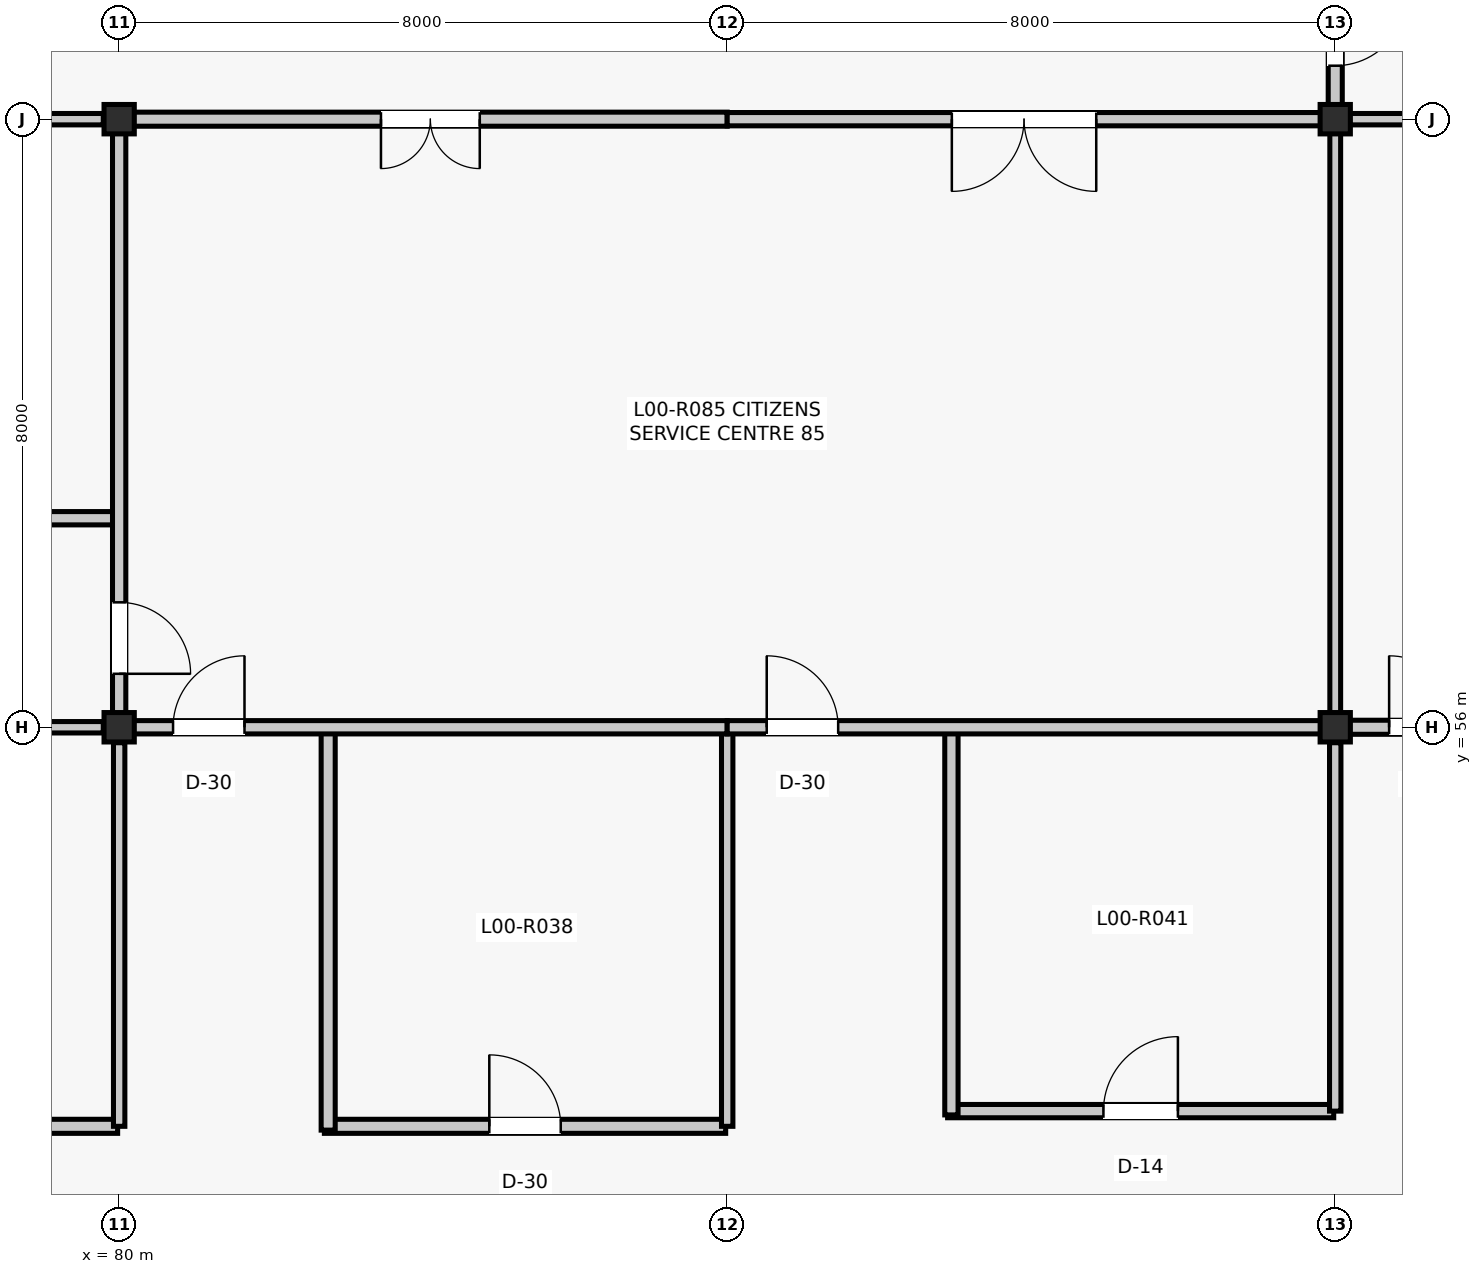
"""IFC4 building model, lengths in metres.
Left out: names, types, materials, properties, quantities, classifications, styles, units other than length and angle.
Written with IfcOpenShell. Run it as: python <this file> out.ifc"""

import sys

from ifc_helpers import new_model, si_unit, direction, frame, frame_2d, origin, origin_2d, place, context, subcontext, project, spatial, rectangle, i_section, extrude, element, fill, save


model = new_model("IFC4")
c1 = context("Model", 3, precision=1e-05, world=origin(), true_north=direction((0.0, 1.0)))
c2 = subcontext(c1, "Body", "Model", "MODEL_VIEW")
j1 = project(units=[si_unit("LENGTHUNIT", "METRE"), si_unit("PLANEANGLEUNIT", "RADIAN")], contexts=[c1])
p1 = place(None, origin())
s1 = spatial("IfcSite", under=j1, at=p1, CompositionType="ELEMENT")
p2 = place(p1, origin())
s2 = spatial("IfcBuilding", under=s1, at=p2, CompositionType="ELEMENT")
p3 = place(p2, origin())
s3 = spatial("IfcBuildingStorey", under=s2, at=p3, CompositionType="ELEMENT", Elevation=0.0)
for number, where, z_axis, x_axis in (
    (1, (80.0, 56.0, 0.0), (0.0, 0.0, 1.0), (1.0, 0.0, 0.0)),
    (2, (80.0, 64.0, 0.0), (0.0, 0.0, 1.0), (1.0, 0.0, 0.0)),
    (3, (96.0, 56.0, 0.0), (0.0, 0.0, 1.0), (1.0, 0.0, 0.0)),
    (4, (96.0, 64.0, 0.0), (0.0, 0.0, 1.0), (1.0, 0.0, 0.0)),
):
    element("IfcColumn", number, at=place(p3, frame(where, z_axis=z_axis, x_axis=x_axis)), inside=s3, PredefinedType="COLUMN", context=c2, shape_type="SweptSolid", body=[
        extrude(i_section(OverallWidth=0.398, OverallDepth=0.387, WebThickness=0.021, FlangeThickness=0.033, FilletRadius=0.015, at=origin_2d()), origin(), (0.0, 0.0, 1.0), 5.28),
    ])
p4 = place(p3, frame((74.7, 50.75, 0.0), z_axis=(0.0, 0.0, 1.0), x_axis=(1.0, 0.0, 0.0)))
e5 = element("IfcWall", 5, at=p4, inside=s3, PredefinedType="PARTITIONING", context=c2, shape_type="SweptSolid", body=[
    extrude(rectangle(XDim=5.28, YDim=0.185, at=frame_2d((2.64, 0.0))), origin(), (0.0, 0.0, 1.0), 4.403),
])
p5 = place(p4, frame((2.12, 0.0, 0.0)))
e6 = element("IfcOpeningElement", 6, at=p5, cuts=e5, PredefinedType="OPENING", context=c2, shape_type="SweptSolid", body=[
    extrude(rectangle(XDim=1.04, YDim=2.18, at=frame_2d((0.52, 1.09))), frame((0.0, 0.103, 0.0), z_axis=(0.0, -1.0, 0.0), x_axis=(1.0, 0.0, 0.0)), (0.0, 0.0, 1.0), 0.205),
])
p6 = place(p3, frame((74.75, 56.0, 0.0), z_axis=(0.0, 0.0, 1.0), x_axis=(1.0, 0.0, 0.0)))
e7 = element("IfcWall", 7, at=p6, inside=s3, PredefinedType="PARTITIONING", context=c2, shape_type="SweptSolid", body=[
    extrude(rectangle(XDim=5.041, YDim=0.15, at=frame_2d((2.521, 0.0))), origin(), (0.0, 0.0, 1.0), 4.327),
])
p7 = place(p3, frame((80.0, 50.75, 0.0), z_axis=(0.0, 0.0, 1.0), x_axis=(0.0, 1.0, 0.0)))
e8 = element("IfcWall", 8, at=p7, inside=s3, PredefinedType="PARTITIONING", context=c2, shape_type="SweptSolid", body=[
    extrude(rectangle(XDim=5.046, YDim=0.15, at=frame_2d((2.523, 0.0))), origin(), (0.0, 0.0, 1.0), 4.403),
])
p8 = place(p3, frame((74.7, 58.75, 0.0), z_axis=(0.0, 0.0, 1.0), x_axis=(1.0, 0.0, 0.0)))
e9 = element("IfcWall", 9, at=p8, inside=s3, PredefinedType="PARTITIONING", context=c2, shape_type="SweptSolid", body=[
    extrude(rectangle(XDim=5.28, YDim=0.175, at=frame_2d((2.64, 0.0))), origin(), (0.0, 0.0, 1.0), 4.412),
])
p9 = place(p8, frame((2.16, 0.0, 0.0)))
e10 = element("IfcOpeningElement", 10, at=p9, cuts=e9, PredefinedType="OPENING", context=c2, shape_type="SweptSolid", body=[
    extrude(rectangle(XDim=0.96, YDim=2.14, at=frame_2d((0.48, 1.07))), frame((0.0, 0.097, 0.0), z_axis=(0.0, -1.0, 0.0), x_axis=(1.0, 0.0, 0.0)), (0.0, 0.0, 1.0), 0.195),
])
p10 = place(p3, frame((74.75, 64.0, 0.0), z_axis=(0.0, 0.0, 1.0), x_axis=(1.0, 0.0, 0.0)))
e11 = element("IfcWall", 11, at=p10, inside=s3, PredefinedType="PARTITIONING", context=c2, shape_type="SweptSolid", body=[
    extrude(rectangle(XDim=5.041, YDim=0.15, at=frame_2d((2.521, 0.0))), origin(), (0.0, 0.0, 1.0), 4.403),
])
p11 = place(p3, frame((82.7, 50.75, 0.0), z_axis=(0.0, 0.0, 1.0), x_axis=(1.0, 0.0, 0.0)))
e12 = element("IfcWall", 12, at=p11, inside=s3, PredefinedType="PARTITIONING", context=c2, shape_type="SweptSolid", body=[
    extrude(rectangle(XDim=5.28, YDim=0.185, at=frame_2d((2.64, 0.0))), origin(), (0.0, 0.0, 1.0), 5.025),
])
p12 = place(p11, frame((2.17, 0.0, 0.0)))
e13 = element("IfcOpeningElement", 13, at=p12, cuts=e12, PredefinedType="OPENING", context=c2, shape_type="SweptSolid", body=[
    extrude(rectangle(XDim=0.94, YDim=2.12, at=frame_2d((0.47, 1.06))), frame((0.0, 0.103, 0.0), z_axis=(0.0, -1.0, 0.0), x_axis=(1.0, 0.0, 0.0)), (0.0, 0.0, 1.0), 0.205),
])
p13 = place(p3, frame((82.75, 50.7, 0.0), z_axis=(0.0, 0.0, 1.0), x_axis=(0.0, 1.0, 0.0)))
e14 = element("IfcWall", 14, at=p13, inside=s3, PredefinedType="PARTITIONING", context=c2, shape_type="SweptSolid", body=[
    extrude(rectangle(XDim=5.28, YDim=0.185, at=frame_2d((2.64, 0.0))), origin(), (0.0, 0.0, 1.0), 4.169),
])
p14 = place(p3, frame((88.0, 50.75, 0.0), z_axis=(0.0, 0.0, 1.0), x_axis=(0.0, 1.0, 0.0)))
e15 = element("IfcWall", 15, at=p14, inside=s3, PredefinedType="PARTITIONING", context=c2, shape_type="SweptSolid", body=[
    extrude(rectangle(XDim=5.23, YDim=0.15, at=frame_2d((2.615, 0.0))), origin(), (0.0, 0.0, 1.0), 4.169),
])
p15 = place(p3, frame((90.9, 50.95, 0.0), z_axis=(0.0, 0.0, 1.0), x_axis=(1.0, 0.0, 0.0)))
e16 = element("IfcWall", 16, at=p15, inside=s3, PredefinedType="PARTITIONING", context=c2, shape_type="SweptSolid", body=[
    extrude(rectangle(XDim=5.08, YDim=0.175, at=frame_2d((2.54, 0.0))), origin(), (0.0, 0.0, 1.0), 4.404),
])
p16 = place(p15, frame((2.05, 0.0, 0.0)))
e17 = element("IfcOpeningElement", 17, at=p16, cuts=e16, PredefinedType="OPENING", context=c2, shape_type="SweptSolid", body=[
    extrude(rectangle(XDim=0.98, YDim=2.15, at=frame_2d((0.49, 1.075))), frame((0.0, 0.097, 0.0), z_axis=(0.0, -1.0, 0.0), x_axis=(1.0, 0.0, 0.0)), (0.0, 0.0, 1.0), 0.195),
])
p17 = place(p3, frame((90.95, 50.9, 0.0), z_axis=(0.0, 0.0, 1.0), x_axis=(0.0, 1.0, 0.0)))
e18 = element("IfcWall", 18, at=p17, inside=s3, PredefinedType="PARTITIONING", context=c2, shape_type="SweptSolid", body=[
    extrude(rectangle(XDim=5.08, YDim=0.175, at=frame_2d((2.54, 0.0))), origin(), (0.0, 0.0, 1.0), 4.169),
])
p18 = place(p3, frame((96.0, 50.95, 0.0), z_axis=(0.0, 0.0, 1.0), x_axis=(0.0, 1.0, 0.0)))
e19 = element("IfcWall", 19, at=p18, inside=s3, PredefinedType="PARTITIONING", context=c2, shape_type="SweptSolid", body=[
    extrude(rectangle(XDim=4.846, YDim=0.15, at=frame_2d((2.423, 0.0))), origin(), (0.0, 0.0, 1.0), 4.404),
])
p19 = place(p3, frame((80.0, 56.184, 0.0), z_axis=(0.0, 0.0, 1.0), x_axis=(0.0, 1.0, 0.0)))
e20 = element("IfcWall", 20, at=p19, inside=s3, PredefinedType="PARTITIONING", context=c2, shape_type="SweptSolid", body=[
    extrude(rectangle(XDim=7.633, YDim=0.175, at=frame_2d((3.816, 0.0))), origin(), (0.0, 0.0, 1.0), 4.412),
])
p20 = place(p19, frame((0.52, 0.0, 0.0)))
e21 = element("IfcOpeningElement", 21, at=p20, cuts=e20, PredefinedType="OPENING", context=c2, shape_type="SweptSolid", body=[
    extrude(rectangle(XDim=0.94, YDim=2.12, at=frame_2d((0.47, 1.06))), frame((0.0, 0.097, 0.0), z_axis=(0.0, -1.0, 0.0), x_axis=(1.0, 0.0, 0.0)), (0.0, 0.0, 1.0), 0.195),
])
p21 = place(p3, frame((80.189, 56.0, 0.0), z_axis=(0.0, 0.0, 1.0), x_axis=(1.0, 0.0, 0.0)))
e22 = element("IfcWall", 22, at=p21, inside=s3, PredefinedType="PARTITIONING", context=c2, shape_type="SweptSolid", body=[
    extrude(rectangle(XDim=7.811, YDim=0.175, at=frame_2d((3.906, 0.0))), origin(), (0.0, 0.0, 1.0), 4.169),
])
p22 = place(p21, frame((0.52, 0.0, 0.0)))
e23 = element("IfcOpeningElement", 23, at=p22, cuts=e22, PredefinedType="OPENING", context=c2, shape_type="SweptSolid", body=[
    extrude(rectangle(XDim=0.94, YDim=2.12, at=frame_2d((0.47, 1.06))), frame((0.0, 0.097, 0.0), z_axis=(0.0, -1.0, 0.0), x_axis=(1.0, 0.0, 0.0)), (0.0, 0.0, 1.0), 0.195),
])
p23 = place(p3, frame((80.189, 64.0, 0.0), z_axis=(0.0, 0.0, 1.0), x_axis=(1.0, 0.0, 0.0)))
e24 = element("IfcWall", 24, at=p23, inside=s3, PredefinedType="PARTITIONING", context=c2, shape_type="SweptSolid", body=[
    extrude(rectangle(XDim=7.811, YDim=0.185, at=frame_2d((3.906, 0.0))), origin(), (0.0, 0.0, 1.0), 4.25),
])
p24 = place(p23, frame((3.256, 0.0, 0.0)))
e25 = element("IfcOpeningElement", 25, at=p24, cuts=e24, PredefinedType="OPENING", context=c2, shape_type="SweptSolid", body=[
    extrude(rectangle(XDim=1.3, YDim=2.2, at=frame_2d((0.65, 1.1))), frame((0.0, 0.103, 0.0), z_axis=(0.0, -1.0, 0.0), x_axis=(1.0, 0.0, 0.0)), (0.0, 0.0, 1.0), 0.205),
])
p25 = place(p3, frame((88.0, 56.0, 0.0), z_axis=(0.0, 0.0, 1.0), x_axis=(1.0, 0.0, 0.0)))
e26 = element("IfcWall", 26, at=p25, inside=s3, PredefinedType="PARTITIONING", context=c2, shape_type="SweptSolid", body=[
    extrude(rectangle(XDim=7.811, YDim=0.175, at=frame_2d((3.906, 0.0))), origin(), (0.0, 0.0, 1.0), 4.169),
])
p26 = place(p25, frame((0.52, 0.0, 0.0)))
e27 = element("IfcOpeningElement", 27, at=p26, cuts=e26, PredefinedType="OPENING", context=c2, shape_type="SweptSolid", body=[
    extrude(rectangle(XDim=0.94, YDim=2.12, at=frame_2d((0.47, 1.06))), frame((0.0, 0.097, 0.0), z_axis=(0.0, -1.0, 0.0), x_axis=(1.0, 0.0, 0.0)), (0.0, 0.0, 1.0), 0.195),
])
p27 = place(p3, frame((96.0, 56.184, 0.0), z_axis=(0.0, 0.0, 1.0), x_axis=(0.0, 1.0, 0.0)))
e28 = element("IfcWall", 28, at=p27, inside=s3, PredefinedType="PARTITIONING", context=c2, shape_type="SweptSolid", body=[
    extrude(rectangle(XDim=7.633, YDim=0.142, at=frame_2d((3.816, 0.0))), origin(), (0.0, 0.0, 1.0), 4.471),
])
p28 = place(p3, frame((88.0, 64.0, 0.0), z_axis=(0.0, 0.0, 1.0), x_axis=(1.0, 0.0, 0.0)))
e29 = element("IfcWall", 29, at=p28, inside=s3, PredefinedType="PARTITIONING", context=c2, shape_type="SweptSolid", body=[
    extrude(rectangle(XDim=7.811, YDim=0.175, at=frame_2d((3.906, 0.0))), origin(), (0.0, 0.0, 1.0), 4.25),
])
p29 = place(p28, frame((2.956, 0.0, 0.0)))
e30 = element("IfcOpeningElement", 30, at=p29, cuts=e29, PredefinedType="OPENING", context=c2, shape_type="SweptSolid", body=[
    extrude(rectangle(XDim=1.9, YDim=2.38, at=frame_2d((0.95, 1.19))), frame((0.0, 0.097, 0.0), z_axis=(0.0, -1.0, 0.0), x_axis=(1.0, 0.0, 0.0)), (0.0, 0.0, 1.0), 0.195),
])
p30 = place(p3, frame((96.0, 64.184, 0.0), z_axis=(0.0, 0.0, 1.0), x_axis=(0.0, 1.0, 0.0)))
e31 = element("IfcWall", 31, at=p30, inside=s3, PredefinedType="PARTITIONING", context=c2, shape_type="SweptSolid", body=[
    extrude(rectangle(XDim=7.633, YDim=0.185, at=frame_2d((3.816, 0.0))), origin(), (0.0, 0.0, 1.0), 4.403),
])
p31 = place(p30, frame((0.52, 0.0, 0.0)))
e32 = element("IfcOpeningElement", 32, at=p31, cuts=e31, PredefinedType="OPENING", context=c2, shape_type="SweptSolid", body=[
    extrude(rectangle(XDim=0.94, YDim=2.12, at=frame_2d((0.47, 1.06))), frame((0.0, 0.103, 0.0), z_axis=(0.0, -1.0, 0.0), x_axis=(1.0, 0.0, 0.0)), (0.0, 0.0, 1.0), 0.205),
])
p32 = place(p3, frame((96.189, 56.0, 0.0), z_axis=(0.0, 0.0, 1.0), x_axis=(1.0, 0.0, 0.0)))
e33 = element("IfcWall", 33, at=p32, inside=s3, PredefinedType="PARTITIONING", context=c2, shape_type="SweptSolid", body=[
    extrude(rectangle(XDim=7.396, YDim=0.185, at=frame_2d((3.698, 0.0))), origin(), (0.0, 0.0, 1.0), 4.404),
])
p33 = place(p32, frame((0.52, 0.0, 0.0)))
e34 = element("IfcOpeningElement", 34, at=p33, cuts=e33, PredefinedType="OPENING", context=c2, shape_type="SweptSolid", body=[
    extrude(rectangle(XDim=0.94, YDim=2.12, at=frame_2d((0.47, 1.06))), frame((0.0, 0.103, 0.0), z_axis=(0.0, -1.0, 0.0), x_axis=(1.0, 0.0, 0.0)), (0.0, 0.0, 1.0), 0.205),
])
p34 = place(p3, frame((96.189, 64.0, 0.0), z_axis=(0.0, 0.0, 1.0), x_axis=(1.0, 0.0, 0.0)))
e35 = element("IfcWall", 35, at=p34, inside=s3, PredefinedType="PARTITIONING", context=c2, shape_type="SweptSolid", body=[
    extrude(rectangle(XDim=7.396, YDim=0.15, at=frame_2d((3.698, 0.0))), origin(), (0.0, 0.0, 1.0), 4.327),
])
p35 = place(p12, origin())
e36 = element("IfcDoor", 36, at=p35, inside=s3, OperationType="SINGLE_SWING_LEFT", PredefinedType="DOOR", context=c2, shape_type="SweptSolid", body=[
    extrude(rectangle(XDim=0.94, YDim=2.12, at=frame_2d((0.47, 1.06))), frame((0.0, 0.025, 0.0), z_axis=(0.0, -1.0, 0.0), x_axis=(1.0, 0.0, 0.0)), (0.0, 0.0, 1.0), 0.05),
])
fill(e13, e36)
p36 = place(p16, origin())
e37 = element("IfcDoor", 37, at=p36, inside=s3, OperationType="SINGLE_SWING_RIGHT", PredefinedType="DOOR", context=c2, shape_type="SweptSolid", body=[
    extrude(rectangle(XDim=0.98, YDim=2.15, at=frame_2d((0.49, 1.075))), frame((0.0, 0.025, 0.0), z_axis=(0.0, -1.0, 0.0), x_axis=(1.0, 0.0, 0.0)), (0.0, 0.0, 1.0), 0.05),
])
fill(e17, e37)
p37 = place(p20, frame((0.94, 0.0, 0.0), z_axis=(0.0, 0.0, 1.0), x_axis=(-1.0, 0.0, 0.0)))
e38 = element("IfcDoor", 38, at=p37, inside=s3, OperationType="SINGLE_SWING_LEFT", PredefinedType="DOOR", context=c2, shape_type="SweptSolid", body=[
    extrude(rectangle(XDim=0.94, YDim=2.12, at=frame_2d((0.47, 1.06))), frame((0.0, 0.025, 0.0), z_axis=(0.0, -1.0, 0.0), x_axis=(1.0, 0.0, 0.0)), (0.0, 0.0, 1.0), 0.05),
])
fill(e21, e38)
p38 = place(p22, origin())
e39 = element("IfcDoor", 39, at=p38, inside=s3, OperationType="SINGLE_SWING_RIGHT", PredefinedType="DOOR", context=c2, shape_type="SweptSolid", body=[
    extrude(rectangle(XDim=0.94, YDim=2.12, at=frame_2d((0.47, 1.06))), frame((0.0, 0.025, 0.0), z_axis=(0.0, -1.0, 0.0), x_axis=(1.0, 0.0, 0.0)), (0.0, 0.0, 1.0), 0.05),
])
fill(e23, e39)
p39 = place(p24, frame((1.3, 0.0, 0.0), z_axis=(0.0, 0.0, 1.0), x_axis=(-1.0, 0.0, 0.0)))
e40 = element("IfcDoor", 40, at=p39, inside=s3, OperationType="DOUBLE_DOOR_SINGLE_SWING", PredefinedType="DOOR", context=c2, shape_type="SweptSolid", body=[
    extrude(rectangle(XDim=1.3, YDim=2.2, at=frame_2d((0.65, 1.1))), frame((0.0, 0.025, 0.0), z_axis=(0.0, -1.0, 0.0), x_axis=(1.0, 0.0, 0.0)), (0.0, 0.0, 1.0), 0.05),
])
fill(e25, e40)
p40 = place(p26, origin())
e41 = element("IfcDoor", 41, at=p40, inside=s3, OperationType="SINGLE_SWING_LEFT", PredefinedType="DOOR", context=c2, shape_type="SweptSolid", body=[
    extrude(rectangle(XDim=0.94, YDim=2.12, at=frame_2d((0.47, 1.06))), frame((0.0, 0.025, 0.0), z_axis=(0.0, -1.0, 0.0), x_axis=(1.0, 0.0, 0.0)), (0.0, 0.0, 1.0), 0.05),
])
fill(e27, e41)
p41 = place(p29, frame((1.9, 0.0, 0.0), z_axis=(0.0, 0.0, 1.0), x_axis=(-1.0, 0.0, 0.0)))
e42 = element("IfcDoor", 42, at=p41, inside=s3, OperationType="DOUBLE_DOOR_SINGLE_SWING", PredefinedType="DOOR", context=c2, shape_type="SweptSolid", body=[
    extrude(rectangle(XDim=1.9, YDim=2.38, at=frame_2d((0.95, 1.19))), frame((0.0, 0.025, 0.0), z_axis=(0.0, -1.0, 0.0), x_axis=(1.0, 0.0, 0.0)), (0.0, 0.0, 1.0), 0.05),
])
fill(e30, e42)
p42 = place(p31, frame((0.94, 0.0, 0.0), z_axis=(0.0, 0.0, 1.0), x_axis=(-1.0, 0.0, 0.0)))
e43 = element("IfcDoor", 43, at=p42, inside=s3, OperationType="SINGLE_SWING_RIGHT", PredefinedType="DOOR", context=c2, shape_type="SweptSolid", body=[
    extrude(rectangle(XDim=0.94, YDim=2.12, at=frame_2d((0.47, 1.06))), frame((0.0, 0.025, 0.0), z_axis=(0.0, -1.0, 0.0), x_axis=(1.0, 0.0, 0.0)), (0.0, 0.0, 1.0), 0.05),
])
fill(e32, e43)
p43 = place(p33, origin())
e44 = element("IfcDoor", 44, at=p43, inside=s3, OperationType="SINGLE_SWING_LEFT", PredefinedType="DOOR", context=c2, shape_type="SweptSolid", body=[
    extrude(rectangle(XDim=0.94, YDim=2.12, at=frame_2d((0.47, 1.06))), frame((0.0, 0.025, 0.0), z_axis=(0.0, -1.0, 0.0), x_axis=(1.0, 0.0, 0.0)), (0.0, 0.0, 1.0), 0.05),
])
fill(e34, e44)
save(model, sys.argv[1])
